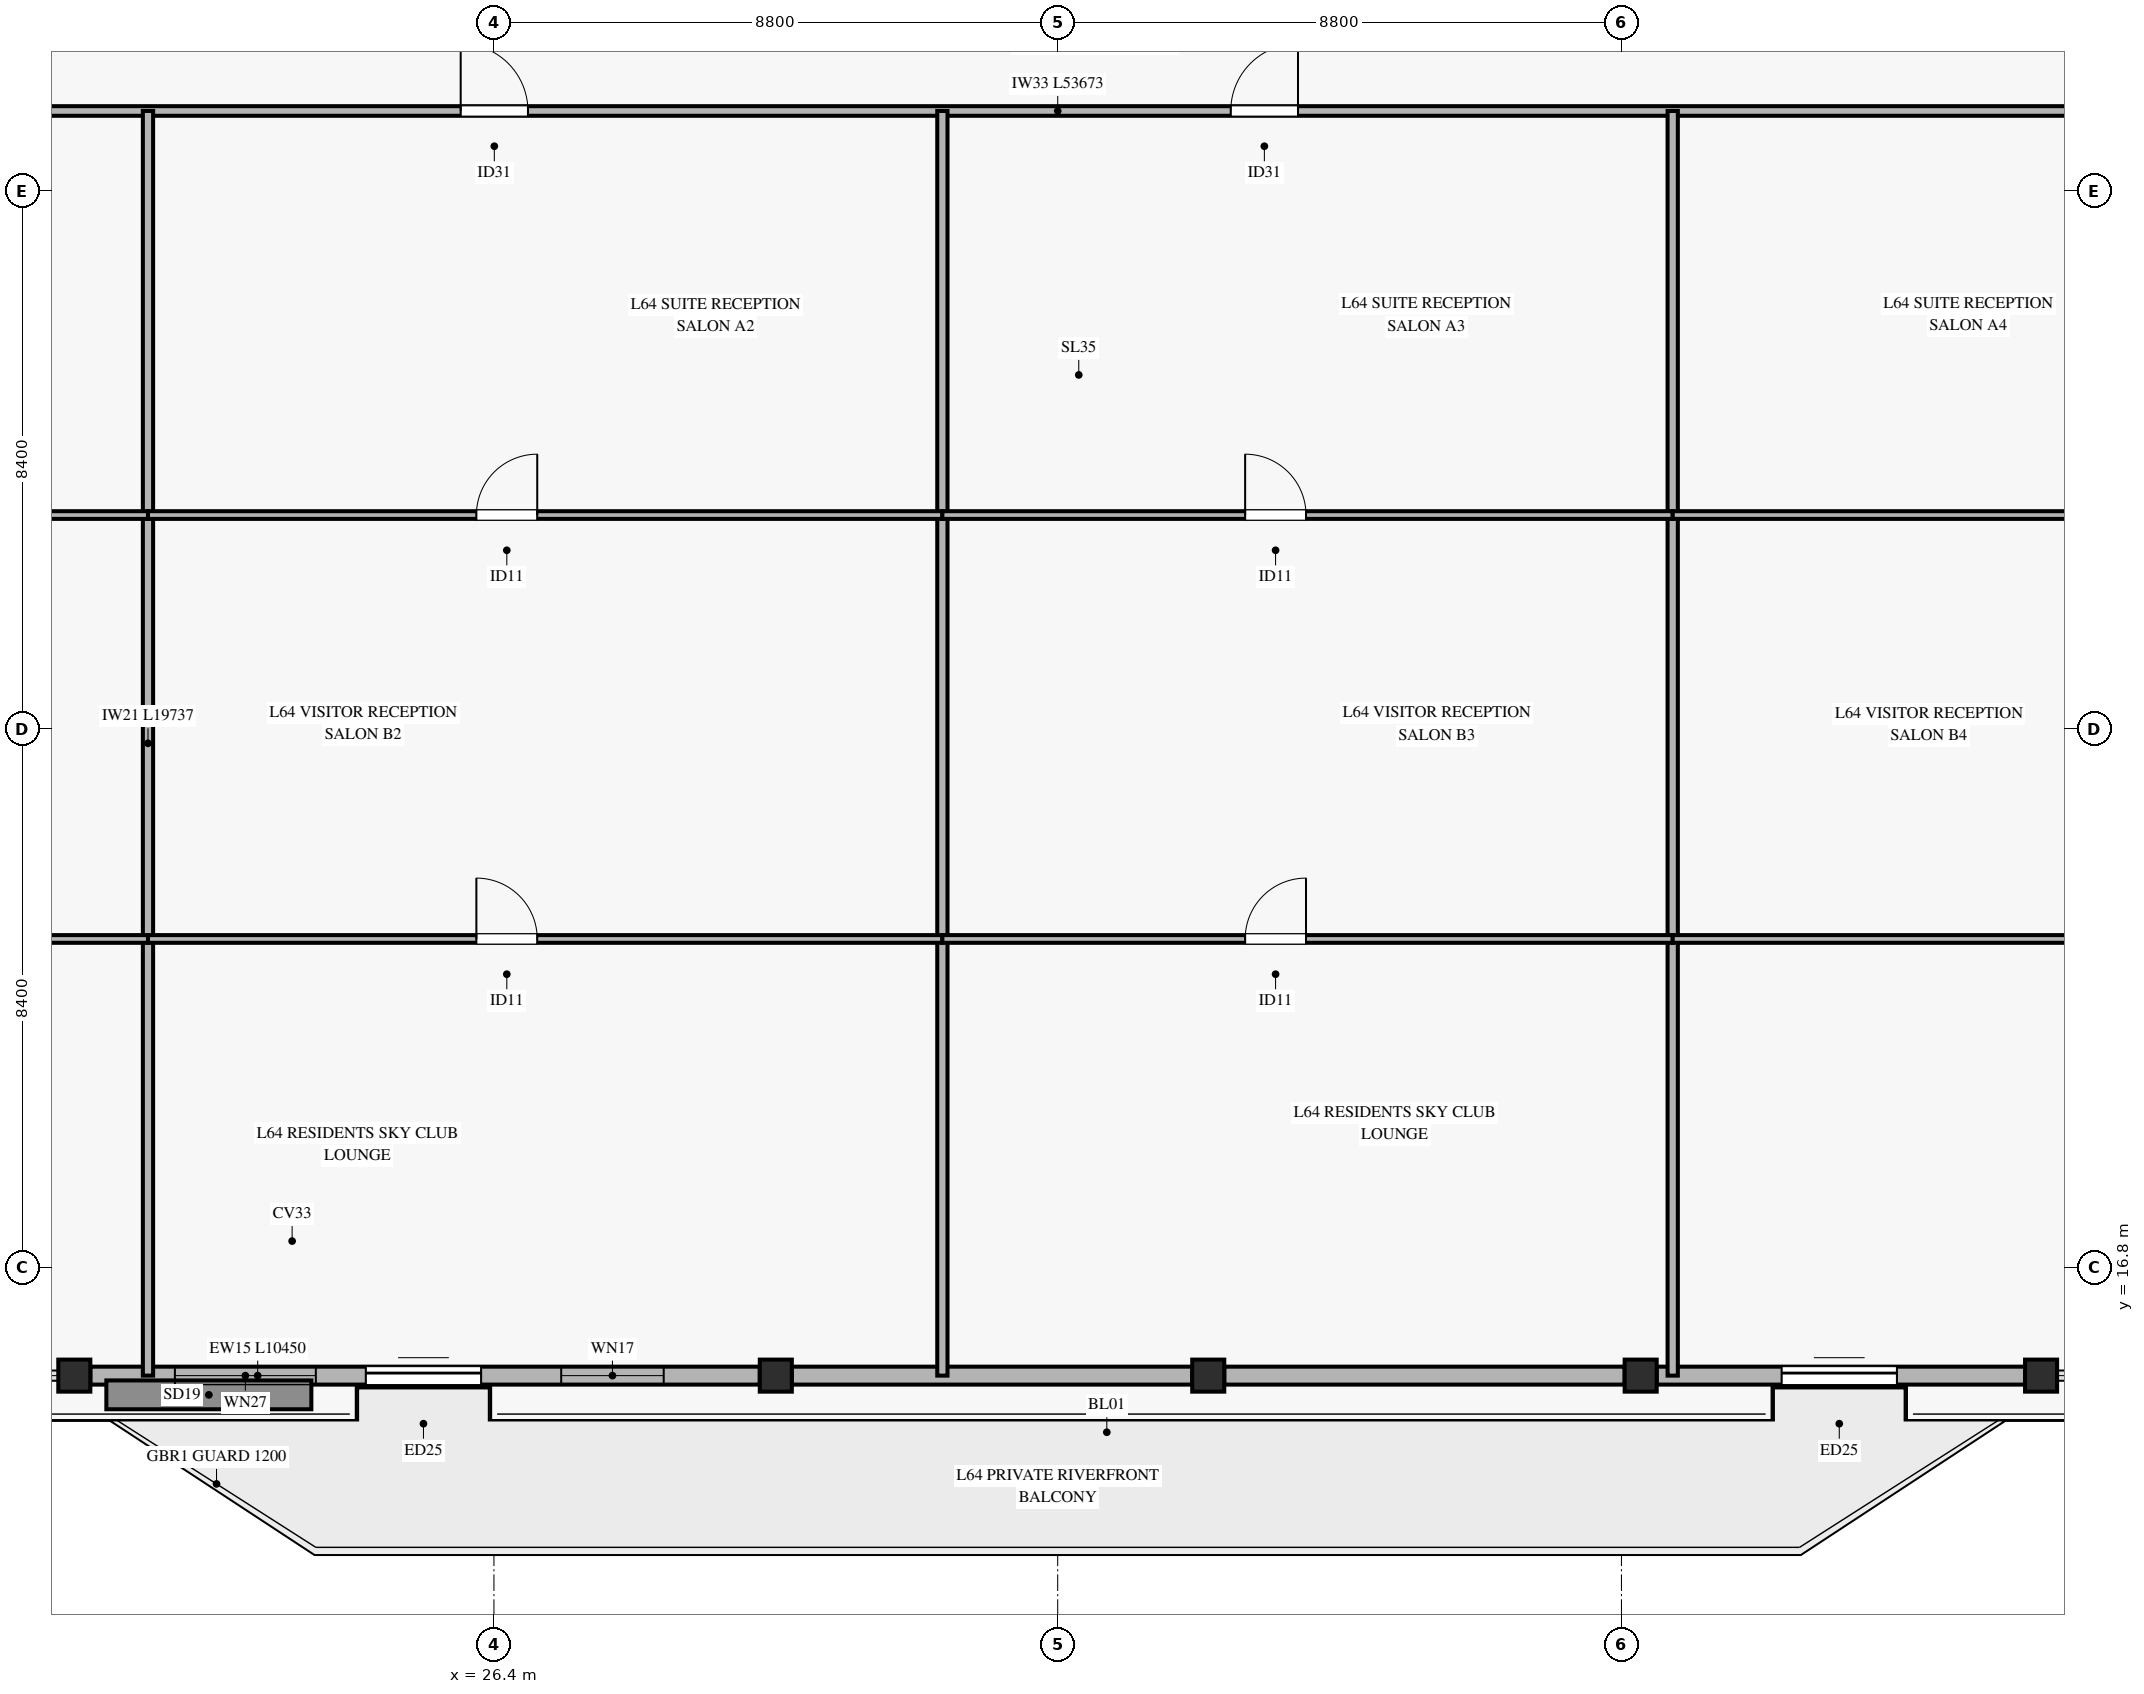
"""IFC4 building model, lengths in metres.
Left out: names, types, materials, properties, quantities, classifications, styles, units other than length and angle.
Written with IfcOpenShell. Run it as: python <this file> out.ifc"""

import sys

from ifc_helpers import new_model, si_unit, direction, frame, frame_2d, origin, origin_2d, place, context, subcontext, project, spatial, rectangle, hollow_rectangle, extrude, source, transform, mapped, element, fill, save


model = new_model("IFC4")
c1 = context("Model", 3, precision=1e-05, world=origin(), true_north=direction((0.0, 1.0)))
c2 = subcontext(c1, "Body", "Model", "MODEL_VIEW")
j1 = project(units=[si_unit("LENGTHUNIT", "METRE"), si_unit("PLANEANGLEUNIT", "RADIAN")], contexts=[c1])
p1 = place(None, origin())
s1 = spatial("IfcSite", under=j1, at=p1, CompositionType="ELEMENT")
p2 = place(p1, origin())
s2 = spatial("IfcBuilding", under=s1, at=p2, CompositionType="ELEMENT")
p3 = place(p2, frame((0.0, 0.0, 251.9)))
s3 = spatial("IfcBuildingStorey", under=s2, at=p3, CompositionType="ELEMENT", Elevation=251.9)
m1 = source(origin(), c2, "Body", "SweptSolid", [
    extrude(hollow_rectangle(XDim=0.5, YDim=0.5, WallThickness=0.024, at=origin_2d()), origin(), (0.0, 0.0, 1.0), 3.185),
])
for number, where, z_axis, x_axis in (
    (1, (19.85, 15.113, 0.0), (0.0, 0.0, 1.0), (1.0, 0.0, 0.0)),
    (2, (30.8, 15.113, 0.0), (0.0, 0.0, 1.0), (1.0, 0.0, 0.0)),
    (3, (37.55, 15.113, 0.0), (0.0, 0.0, 1.0), (1.0, 0.0, 0.0)),
    (4, (44.3, 15.113, 0.0), (0.0, 0.0, 1.0), (1.0, 0.0, 0.0)),
    (5, (50.55, 15.113, 0.0), (0.0, 0.0, 1.0), (1.0, 0.0, 0.0)),
):
    element("IfcColumn", number, at=place(p3, frame(where, z_axis=z_axis, x_axis=x_axis)), inside=s3, PredefinedType="COLUMN", context=c2, shape_type="MappedRepresentation", body=[
        mapped(m1, transform((0.0, 0.0, 0.0), x_axis=(1.0, 0.0, 0.0), y_axis=(0.0, 1.0, 0.0), z_axis=(0.0, 0.0, 1.0), scale=1.0)),
    ])
p4 = place(p3, frame((20.1, 15.113, 0.0), z_axis=(0.0, 0.0, 1.0), x_axis=(1.0, 0.0, 0.0)))
e6 = element("IfcWall", 6, at=p4, inside=s3, PredefinedType="SOLIDWALL", context=c2, shape_type="SweptSolid", body=[
    extrude(rectangle(XDim=10.45, YDim=0.28, at=frame_2d((5.225, 0.0))), origin(), (0.0, 0.0, 1.0), 2.815),
])
p5 = place(p4, frame((4.3, 0.0, 0.0)))
e7 = element("IfcOpeningElement", 7, at=p5, cuts=e6, PredefinedType="OPENING", context=c2, shape_type="SweptSolid", body=[
    extrude(rectangle(XDim=1.8, YDim=2.25, at=frame_2d((0.9, 1.125))), frame((0.0, 0.15, 0.0), z_axis=(0.0, -1.0, 0.0), x_axis=(1.0, 0.0, 0.0)), (0.0, 0.0, 1.0), 0.3),
])
p6 = place(p4, frame((1.32, 0.0, 0.45)))
e8 = element("IfcOpeningElement", 8, at=p6, cuts=e6, PredefinedType="OPENING", context=c2, shape_type="SweptSolid", body=[
    extrude(rectangle(XDim=2.2, YDim=2.1, at=frame_2d((1.1, 1.05))), frame((0.0, 0.15, 0.0), z_axis=(0.0, -1.0, 0.0), x_axis=(1.0, 0.0, 0.0)), (0.0, 0.0, 1.0), 0.3),
])
p7 = place(p4, frame((7.35, 0.0, 0.45)))
e9 = element("IfcOpeningElement", 9, at=p7, cuts=e6, PredefinedType="OPENING", context=c2, shape_type="SweptSolid", body=[
    extrude(rectangle(XDim=1.6, YDim=2.0, at=frame_2d((0.8, 1.0))), frame((0.0, 0.15, 0.0), z_axis=(0.0, -1.0, 0.0), x_axis=(1.0, 0.0, 0.0)), (0.0, 0.0, 1.0), 0.3),
])
for number, where, z_axis, x_axis in (
    (10, (31.05, 15.113, 0.0), (0.0, 0.0, 1.0), (1.0, 0.0, 0.0)),
    (11, (37.8, 15.113, 0.0), (0.0, 0.0, 1.0), (1.0, 0.0, 0.0)),
):
    element("IfcWall", number, at=place(p3, frame(where, z_axis=z_axis, x_axis=x_axis)), inside=s3, PredefinedType="SOLIDWALL", context=c2, shape_type="SweptSolid", body=[
        extrude(rectangle(XDim=6.25, YDim=0.28, at=frame_2d((3.125, 0.0))), origin(), (0.0, 0.0, 1.0), 2.815),
    ])
p8 = place(p3, frame((44.55, 15.113, 0.0), z_axis=(0.0, 0.0, 1.0), x_axis=(1.0, 0.0, 0.0)))
e12 = element("IfcWall", 12, at=p8, inside=s3, PredefinedType="SOLIDWALL", context=c2, shape_type="SweptSolid", body=[
    extrude(rectangle(XDim=5.75, YDim=0.28, at=frame_2d((2.875, 0.0))), origin(), (0.0, 0.0, 1.0), 2.815),
])
p9 = place(p8, frame((1.95, 0.0, 0.0)))
e13 = element("IfcOpeningElement", 13, at=p9, cuts=e12, PredefinedType="OPENING", context=c2, shape_type="SweptSolid", body=[
    extrude(rectangle(XDim=1.8, YDim=2.25, at=frame_2d((0.9, 1.125))), frame((0.0, 0.15, 0.0), z_axis=(0.0, -1.0, 0.0), x_axis=(1.0, 0.0, 0.0)), (0.0, 0.0, 1.0), 0.3),
])
p10 = place(p3, frame((8.364, 34.85, 0.0), z_axis=(0.0, 0.0, 1.0), x_axis=(1.0, 0.0, 0.0)))
e14 = element("IfcWall", 14, at=p10, inside=s3, PredefinedType="PARTITIONING", context=c2, shape_type="SweptSolid", body=[
    extrude(rectangle(XDim=53.673, YDim=0.15, at=frame_2d((26.836, 0.0))), origin(), (0.0, 0.0, 1.0), 2.47),
])
p11 = place(p10, frame((5.095, 0.0, 0.0)))
e15 = element("IfcOpeningElement", 15, at=p11, cuts=e14, PredefinedType="OPENING", context=c2, shape_type="SweptSolid", body=[
    extrude(rectangle(XDim=1.05, YDim=2.15, at=frame_2d((0.525, 1.075))), frame((0.0, 0.085, 0.0), z_axis=(0.0, -1.0, 0.0), x_axis=(1.0, 0.0, 0.0)), (0.0, 0.0, 1.0), 0.17),
])
p12 = place(p10, frame((17.517, 0.0, 0.0)))
e16 = element("IfcOpeningElement", 16, at=p12, cuts=e14, PredefinedType="OPENING", context=c2, shape_type="SweptSolid", body=[
    extrude(rectangle(XDim=1.05, YDim=2.15, at=frame_2d((0.525, 1.075))), frame((0.0, 0.085, 0.0), z_axis=(0.0, -1.0, 0.0), x_axis=(1.0, 0.0, 0.0)), (0.0, 0.0, 1.0), 0.17),
])
p13 = place(p10, frame((29.537, 0.0, 0.0)))
e17 = element("IfcOpeningElement", 17, at=p13, cuts=e14, PredefinedType="OPENING", context=c2, shape_type="SweptSolid", body=[
    extrude(rectangle(XDim=1.05, YDim=2.15, at=frame_2d((0.525, 1.075))), frame((0.0, 0.085, 0.0), z_axis=(0.0, -1.0, 0.0), x_axis=(1.0, 0.0, 0.0)), (0.0, 0.0, 1.0), 0.17),
])
p14 = place(p10, frame((43.079, 0.0, 0.0)))
e18 = element("IfcOpeningElement", 18, at=p14, cuts=e14, PredefinedType="OPENING", context=c2, shape_type="SweptSolid", body=[
    extrude(rectangle(XDim=1.05, YDim=2.15, at=frame_2d((0.525, 1.075))), frame((0.0, 0.085, 0.0), z_axis=(0.0, -1.0, 0.0), x_axis=(1.0, 0.0, 0.0)), (0.0, 0.0, 1.0), 0.17),
])
for number, where, z_axis, x_axis in (
    (19, (21.0, 15.113, 0.0), (0.0, 0.0, 1.0), (0.0, 1.0, 0.0)),
    (20, (33.4, 15.113, 0.0), (0.0, 0.0, 1.0), (0.0, 1.0, 0.0)),
    (21, (44.8, 15.113, 0.0), (0.0, 0.0, 1.0), (0.0, 1.0, 0.0)),
):
    element("IfcWall", number, at=place(p3, frame(where, z_axis=z_axis, x_axis=x_axis)), inside=s3, PredefinedType="PARTITIONING", context=c2, shape_type="SweptSolid", body=[
        extrude(rectangle(XDim=19.737, YDim=0.16, at=frame_2d((9.869, 0.0))), origin(), (0.0, 0.0, 1.0), 2.77),
    ])
p15 = place(p3, frame((8.364, 21.928, 0.0), z_axis=(0.0, 0.0, 1.0), x_axis=(1.0, 0.0, 0.0)))
e22 = element("IfcWall", 22, at=p15, inside=s3, PredefinedType="PARTITIONING", context=c2, shape_type="SweptSolid", body=[
    extrude(rectangle(XDim=12.636, YDim=0.12, at=frame_2d((6.318, 0.0))), origin(), (0.0, 0.0, 1.0), 2.47),
])
p16 = place(p15, frame((5.34, 0.0, 0.0)))
e23 = element("IfcOpeningElement", 23, at=p16, cuts=e22, PredefinedType="OPENING", context=c2, shape_type="SweptSolid", body=[
    extrude(rectangle(XDim=0.95, YDim=2.1, at=frame_2d((0.475, 1.05))), frame((0.0, 0.07, 0.0), z_axis=(0.0, -1.0, 0.0), x_axis=(1.0, 0.0, 0.0)), (0.0, 0.0, 1.0), 0.14),
])
p17 = place(p3, frame((8.364, 28.544, 0.0), z_axis=(0.0, 0.0, 1.0), x_axis=(1.0, 0.0, 0.0)))
e24 = element("IfcWall", 24, at=p17, inside=s3, PredefinedType="PARTITIONING", context=c2, shape_type="SweptSolid", body=[
    extrude(rectangle(XDim=12.636, YDim=0.12, at=frame_2d((6.318, 0.0))), origin(), (0.0, 0.0, 1.0), 2.47),
])
p18 = place(p17, frame((5.34, 0.0, 0.0)))
e25 = element("IfcOpeningElement", 25, at=p18, cuts=e24, PredefinedType="OPENING", context=c2, shape_type="SweptSolid", body=[
    extrude(rectangle(XDim=0.95, YDim=2.1, at=frame_2d((0.475, 1.05))), frame((0.0, 0.07, 0.0), z_axis=(0.0, -1.0, 0.0), x_axis=(1.0, 0.0, 0.0)), (0.0, 0.0, 1.0), 0.14),
])
p19 = place(p3, frame((21.0, 21.928, 0.0), z_axis=(0.0, 0.0, 1.0), x_axis=(1.0, 0.0, 0.0)))
e26 = element("IfcWall", 26, at=p19, inside=s3, PredefinedType="PARTITIONING", context=c2, shape_type="SweptSolid", body=[
    extrude(rectangle(XDim=12.4, YDim=0.12, at=frame_2d((6.2, 0.0))), origin(), (0.0, 0.0, 1.0), 2.47),
])
p20 = place(p19, frame((5.126, 0.0, 0.0)))
e27 = element("IfcOpeningElement", 27, at=p20, cuts=e26, PredefinedType="OPENING", context=c2, shape_type="SweptSolid", body=[
    extrude(rectangle(XDim=0.95, YDim=2.1, at=frame_2d((0.475, 1.05))), frame((0.0, 0.07, 0.0), z_axis=(0.0, -1.0, 0.0), x_axis=(1.0, 0.0, 0.0)), (0.0, 0.0, 1.0), 0.14),
])
p21 = place(p3, frame((21.0, 28.544, 0.0), z_axis=(0.0, 0.0, 1.0), x_axis=(1.0, 0.0, 0.0)))
e28 = element("IfcWall", 28, at=p21, inside=s3, PredefinedType="PARTITIONING", context=c2, shape_type="SweptSolid", body=[
    extrude(rectangle(XDim=12.4, YDim=0.12, at=frame_2d((6.2, 0.0))), origin(), (0.0, 0.0, 1.0), 2.47),
])
p22 = place(p21, frame((5.126, 0.0, 0.0)))
e29 = element("IfcOpeningElement", 29, at=p22, cuts=e28, PredefinedType="OPENING", context=c2, shape_type="SweptSolid", body=[
    extrude(rectangle(XDim=0.95, YDim=2.1, at=frame_2d((0.475, 1.05))), frame((0.0, 0.07, 0.0), z_axis=(0.0, -1.0, 0.0), x_axis=(1.0, 0.0, 0.0)), (0.0, 0.0, 1.0), 0.14),
])
p23 = place(p3, frame((33.4, 21.928, 0.0), z_axis=(0.0, 0.0, 1.0), x_axis=(1.0, 0.0, 0.0)))
e30 = element("IfcWall", 30, at=p23, inside=s3, PredefinedType="PARTITIONING", context=c2, shape_type="SweptSolid", body=[
    extrude(rectangle(XDim=11.4, YDim=0.12, at=frame_2d((5.7, 0.0))), origin(), (0.0, 0.0, 1.0), 2.47),
])
p24 = place(p23, frame((4.726, 0.0, 0.0)))
e31 = element("IfcOpeningElement", 31, at=p24, cuts=e30, PredefinedType="OPENING", context=c2, shape_type="SweptSolid", body=[
    extrude(rectangle(XDim=0.95, YDim=2.1, at=frame_2d((0.475, 1.05))), frame((0.0, 0.07, 0.0), z_axis=(0.0, -1.0, 0.0), x_axis=(1.0, 0.0, 0.0)), (0.0, 0.0, 1.0), 0.14),
])
p25 = place(p3, frame((33.4, 28.544, 0.0), z_axis=(0.0, 0.0, 1.0), x_axis=(1.0, 0.0, 0.0)))
e32 = element("IfcWall", 32, at=p25, inside=s3, PredefinedType="PARTITIONING", context=c2, shape_type="SweptSolid", body=[
    extrude(rectangle(XDim=11.4, YDim=0.12, at=frame_2d((5.7, 0.0))), origin(), (0.0, 0.0, 1.0), 2.47),
])
p26 = place(p25, frame((4.726, 0.0, 0.0)))
e33 = element("IfcOpeningElement", 33, at=p26, cuts=e32, PredefinedType="OPENING", context=c2, shape_type="SweptSolid", body=[
    extrude(rectangle(XDim=0.95, YDim=2.1, at=frame_2d((0.475, 1.05))), frame((0.0, 0.07, 0.0), z_axis=(0.0, -1.0, 0.0), x_axis=(1.0, 0.0, 0.0)), (0.0, 0.0, 1.0), 0.14),
])
p27 = place(p3, frame((44.8, 21.928, 0.0), z_axis=(0.0, 0.0, 1.0), x_axis=(1.0, 0.0, 0.0)))
e34 = element("IfcWall", 34, at=p27, inside=s3, PredefinedType="PARTITIONING", context=c2, shape_type="SweptSolid", body=[
    extrude(rectangle(XDim=17.237, YDim=0.12, at=frame_2d((8.619, 0.0))), origin(), (0.0, 0.0, 1.0), 2.47),
])
p28 = place(p27, frame((6.981, 0.0, 0.0)))
e35 = element("IfcOpeningElement", 35, at=p28, cuts=e34, PredefinedType="OPENING", context=c2, shape_type="SweptSolid", body=[
    extrude(rectangle(XDim=0.95, YDim=2.1, at=frame_2d((0.475, 1.05))), frame((0.0, 0.07, 0.0), z_axis=(0.0, -1.0, 0.0), x_axis=(1.0, 0.0, 0.0)), (0.0, 0.0, 1.0), 0.14),
])
p29 = place(p3, frame((44.8, 28.544, 0.0), z_axis=(0.0, 0.0, 1.0), x_axis=(1.0, 0.0, 0.0)))
e36 = element("IfcWall", 36, at=p29, inside=s3, PredefinedType="PARTITIONING", context=c2, shape_type="SweptSolid", body=[
    extrude(rectangle(XDim=17.237, YDim=0.12, at=frame_2d((8.619, 0.0))), origin(), (0.0, 0.0, 1.0), 2.47),
])
p30 = place(p29, frame((6.981, 0.0, 0.0)))
e37 = element("IfcOpeningElement", 37, at=p30, cuts=e36, PredefinedType="OPENING", context=c2, shape_type="SweptSolid", body=[
    extrude(rectangle(XDim=0.95, YDim=2.1, at=frame_2d((0.475, 1.05))), frame((0.0, 0.07, 0.0), z_axis=(0.0, -1.0, 0.0), x_axis=(1.0, 0.0, 0.0)), (0.0, 0.0, 1.0), 0.14),
])
m2 = source(origin(), c2, "Body", "SweptSolid", [
    extrude(rectangle(XDim=1.8, YDim=2.25, at=frame_2d((0.9, 1.125))), frame((0.0, 0.025, 0.0), z_axis=(0.0, -1.0, 0.0), x_axis=(1.0, 0.0, 0.0)), (0.0, 0.0, 1.0), 0.05),
])
p31 = place(p5, origin())
e38 = element("IfcDoor", 38, at=p31, inside=s3, OperationType="SLIDING_TO_LEFT", PredefinedType="DOOR", context=c2, shape_type="MappedRepresentation", body=[
    mapped(m2, transform((0.0, 0.0, 0.0), x_axis=(1.0, 0.0, 0.0), y_axis=(0.0, 1.0, 0.0), z_axis=(0.0, 0.0, 1.0), scale=1.0)),
])
fill(e7, e38)
m3 = source(origin(), c2, "Body", "SweptSolid", [
    extrude(rectangle(XDim=2.2, YDim=2.1, at=frame_2d((1.1, 1.05))), frame((0.0, 0.03, 0.0), z_axis=(0.0, -1.0, 0.0), x_axis=(1.0, 0.0, 0.0)), (0.0, 0.0, 1.0), 0.06),
])
p32 = place(p6, origin())
e39 = element("IfcWindow", 39, at=p32, inside=s3, PartitioningType="SINGLE_PANEL", PredefinedType="WINDOW", context=c2, shape_type="MappedRepresentation", body=[
    mapped(m3, transform((0.0, 0.0, 0.0), x_axis=(1.0, 0.0, 0.0), y_axis=(0.0, 1.0, 0.0), z_axis=(0.0, 0.0, 1.0), scale=1.0)),
])
fill(e8, e39)
m4 = source(origin(), c2, "Body", "SweptSolid", [
    extrude(rectangle(XDim=1.6, YDim=2.0, at=frame_2d((0.8, 1.0))), frame((0.0, 0.03, 0.0), z_axis=(0.0, -1.0, 0.0), x_axis=(1.0, 0.0, 0.0)), (0.0, 0.0, 1.0), 0.06),
])
p33 = place(p7, origin())
e40 = element("IfcWindow", 40, at=p33, inside=s3, PartitioningType="SINGLE_PANEL", PredefinedType="WINDOW", context=c2, shape_type="MappedRepresentation", body=[
    mapped(m4, transform((0.0, 0.0, 0.0), x_axis=(1.0, 0.0, 0.0), y_axis=(0.0, 1.0, 0.0), z_axis=(0.0, 0.0, 1.0), scale=1.0)),
])
fill(e9, e40)
p34 = place(p9, origin())
e41 = element("IfcDoor", 41, at=p34, inside=s3, OperationType="SLIDING_TO_LEFT", PredefinedType="DOOR", context=c2, shape_type="MappedRepresentation", body=[
    mapped(m2, transform((0.0, 0.0, 0.0), x_axis=(1.0, 0.0, 0.0), y_axis=(0.0, 1.0, 0.0), z_axis=(0.0, 0.0, 1.0), scale=1.0)),
])
fill(e13, e41)
m5 = source(origin(), c2, "Body", "SweptSolid", [
    extrude(rectangle(XDim=1.05, YDim=2.15, at=frame_2d((0.525, 1.075))), frame((0.0, 0.025, 0.0), z_axis=(0.0, -1.0, 0.0), x_axis=(1.0, 0.0, 0.0)), (0.0, 0.0, 1.0), 0.05),
])
p35 = place(p12, origin())
e42 = element("IfcDoor", 42, at=p35, inside=s3, OperationType="SINGLE_SWING_LEFT", PredefinedType="DOOR", context=c2, shape_type="MappedRepresentation", body=[
    mapped(m5, transform((0.0, 0.0, 0.0), x_axis=(1.0, 0.0, 0.0), y_axis=(0.0, 1.0, 0.0), z_axis=(0.0, 0.0, 1.0), scale=1.0)),
])
fill(e16, e42)
m6 = source(origin(), c2, "Body", "SweptSolid", [
    extrude(rectangle(XDim=0.95, YDim=2.1, at=frame_2d((0.475, 1.05))), frame((0.0, 0.025, 0.0), z_axis=(0.0, -1.0, 0.0), x_axis=(1.0, 0.0, 0.0)), (0.0, 0.0, 1.0), 0.05),
])
p36 = place(p22, origin())
e43 = element("IfcDoor", 43, at=p36, inside=s3, OperationType="SINGLE_SWING_RIGHT", PredefinedType="DOOR", context=c2, shape_type="MappedRepresentation", body=[
    mapped(m6, transform((0.0, 0.0, 0.0), x_axis=(1.0, 0.0, 0.0), y_axis=(0.0, 1.0, 0.0), z_axis=(0.0, 0.0, 1.0), scale=1.0)),
])
fill(e29, e43)
p37 = place(p20, origin())
e44 = element("IfcDoor", 44, at=p37, inside=s3, OperationType="SINGLE_SWING_LEFT", PredefinedType="DOOR", context=c2, shape_type="MappedRepresentation", body=[
    mapped(m6, transform((0.0, 0.0, 0.0), x_axis=(1.0, 0.0, 0.0), y_axis=(0.0, 1.0, 0.0), z_axis=(0.0, 0.0, 1.0), scale=1.0)),
])
fill(e27, e44)
p38 = place(p13, origin())
e45 = element("IfcDoor", 45, at=p38, inside=s3, OperationType="SINGLE_SWING_RIGHT", PredefinedType="DOOR", context=c2, shape_type="MappedRepresentation", body=[
    mapped(m5, transform((0.0, 0.0, 0.0), x_axis=(1.0, 0.0, 0.0), y_axis=(0.0, 1.0, 0.0), z_axis=(0.0, 0.0, 1.0), scale=1.0)),
])
fill(e17, e45)
p39 = place(p26, origin())
e46 = element("IfcDoor", 46, at=p39, inside=s3, OperationType="SINGLE_SWING_LEFT", PredefinedType="DOOR", context=c2, shape_type="MappedRepresentation", body=[
    mapped(m6, transform((0.0, 0.0, 0.0), x_axis=(1.0, 0.0, 0.0), y_axis=(0.0, 1.0, 0.0), z_axis=(0.0, 0.0, 1.0), scale=1.0)),
])
fill(e33, e46)
p40 = place(p24, origin())
e47 = element("IfcDoor", 47, at=p40, inside=s3, OperationType="SINGLE_SWING_RIGHT", PredefinedType="DOOR", context=c2, shape_type="MappedRepresentation", body=[
    mapped(m6, transform((0.0, 0.0, 0.0), x_axis=(1.0, 0.0, 0.0), y_axis=(0.0, 1.0, 0.0), z_axis=(0.0, 0.0, 1.0), scale=1.0)),
])
fill(e31, e47)
save(model, sys.argv[1])
